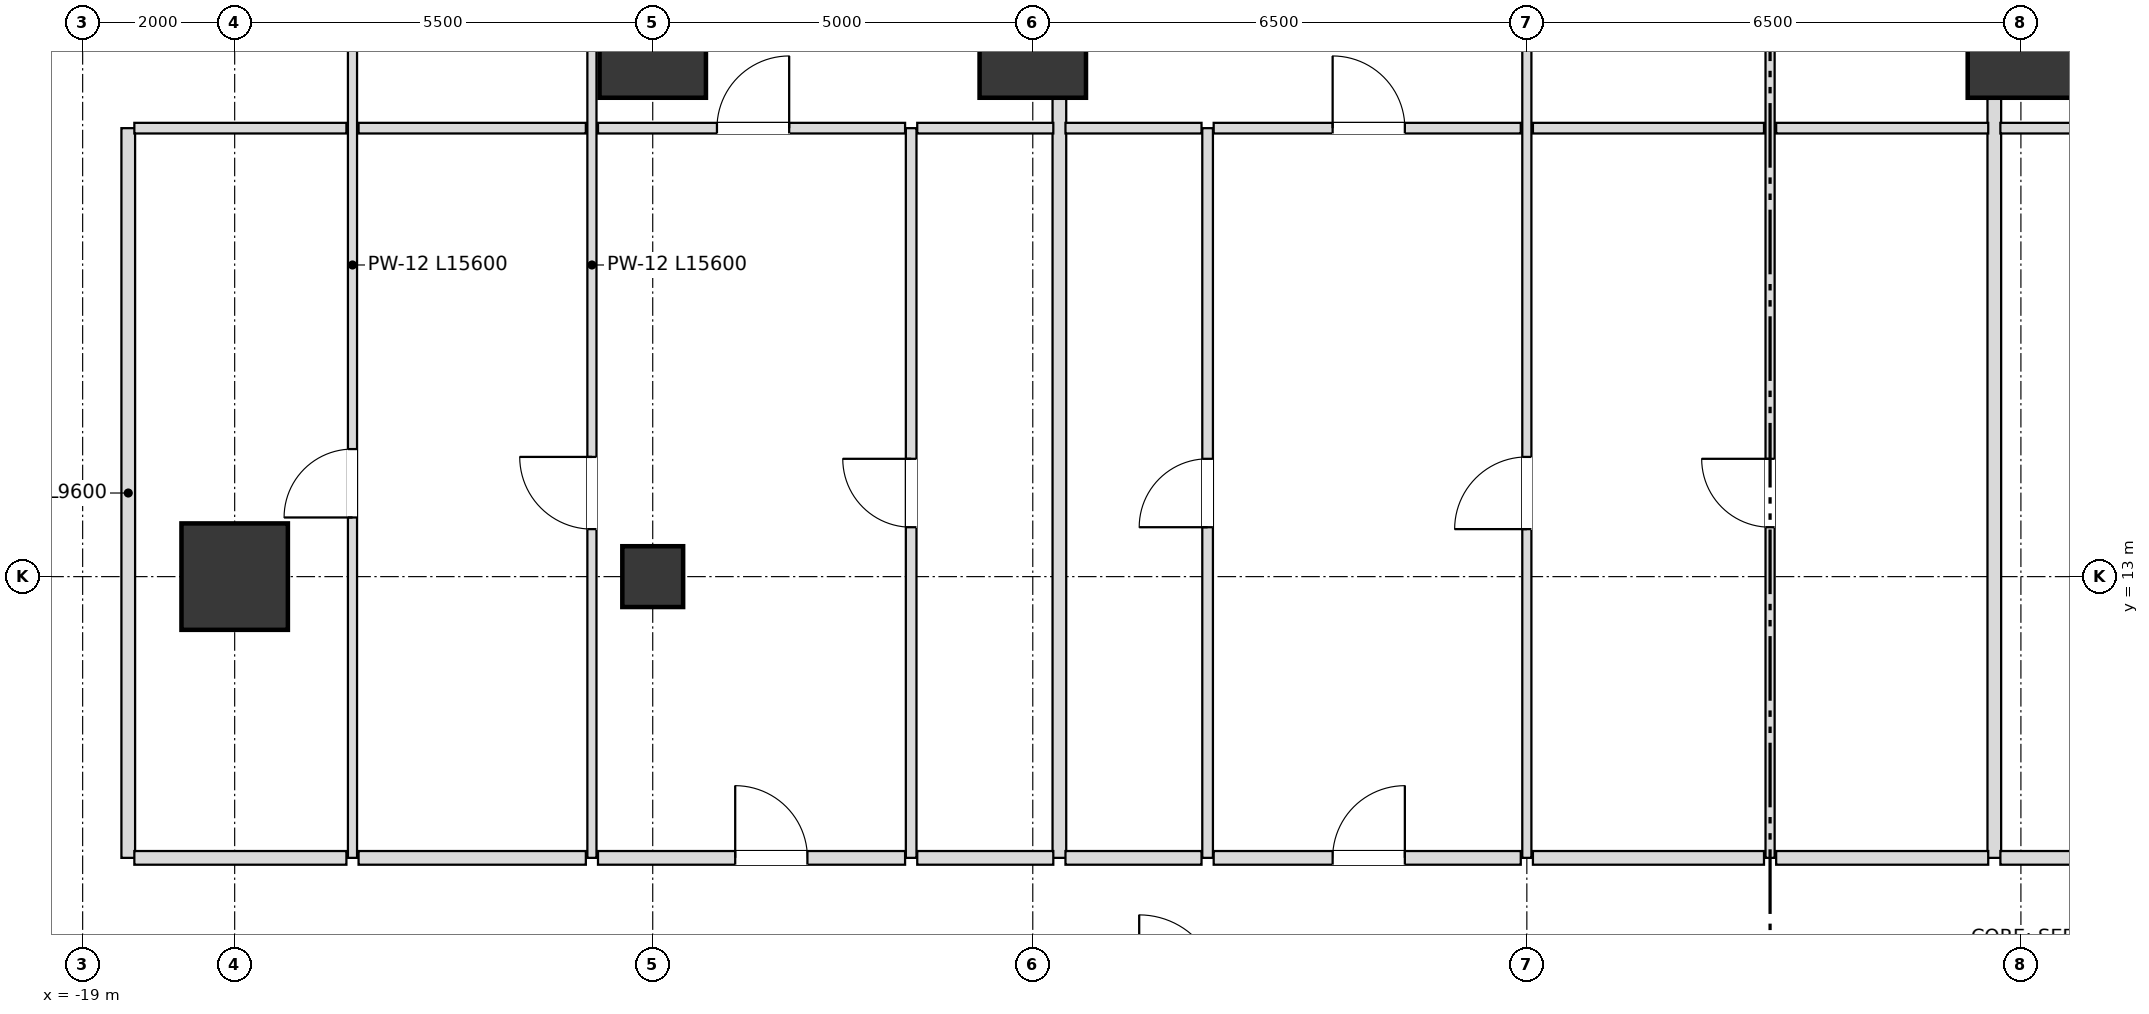
"""IFC4 building model, lengths in metres.
Left out: names, types, materials, properties, quantities, classifications, styles, units other than length and angle.
Written with IfcOpenShell. Run it as: python <this file> out.ifc"""

import sys

from ifc_helpers import new_model, si_unit, direction, frame, frame_2d, origin, origin_2d, place, context, subcontext, project, spatial, rectangle, extrude, element, fill, save


model = new_model("IFC4")
c1 = context("Model", 3, precision=1e-05, world=origin(), true_north=direction((0.0, 1.0)))
c2 = subcontext(c1, "Body", "Model", "MODEL_VIEW")
j1 = project(units=[si_unit("LENGTHUNIT", "METRE"), si_unit("PLANEANGLEUNIT", "RADIAN")], contexts=[c1])
p1 = place(None, origin())
s1 = spatial("IfcSite", under=j1, at=p1, CompositionType="ELEMENT")
p2 = place(p1, origin())
s2 = spatial("IfcBuilding", under=s1, at=p2, CompositionType="ELEMENT")
p3 = place(p2, frame((0.0, 0.0, 39.6)))
s3 = spatial("IfcBuildingStorey", under=s2, at=p3, CompositionType="ELEMENT", Elevation=39.6)
for number, where, z_axis, x_axis in (
    (1, (6.5, 20.0, 0.0), (0.0, 0.0, 1.0), (1.0, 0.0, 0.0)),
    (2, (-6.5, 20.0, 0.0), (0.0, 0.0, 1.0), (1.0, 0.0, 0.0)),
    (3, (-11.5, 20.0, 0.0), (0.0, 0.0, 1.0), (1.0, 0.0, 0.0)),
    (4, (-17.0, 13.0, 0.0), (0.0, 0.0, 1.0), (1.0, 0.0, 0.0)),
):
    element("IfcColumn", number, at=place(p3, frame(where, z_axis=z_axis, x_axis=x_axis)), inside=s3, PredefinedType="USERDEFINED", context=c2, shape_type="SweptSolid", body=[
        extrude(rectangle(XDim=1.4, YDim=1.4, at=origin_2d()), origin(), (0.0, 0.0, 1.0), 3.6),
    ])
p4 = place(p3, frame((-11.5, 13.0, 0.0), z_axis=(0.0, 0.0, 1.0), x_axis=(1.0, 0.0, 0.0)))
e5 = element("IfcColumn", 5, at=p4, inside=s3, PredefinedType="COLUMN", context=c2, shape_type="SweptSolid", body=[
    extrude(rectangle(XDim=0.8, YDim=0.8, at=origin_2d()), origin(), (0.0, 0.0, 1.0), 3.6),
])
p5 = place(p3, frame((-18.4, 9.3, 0.0), z_axis=(0.0, 0.0, 1.0), x_axis=(0.0, 1.0, 0.0)))
e6 = element("IfcWall", 6, at=p5, inside=s3, PredefinedType="PARTITIONING", context=c2, shape_type="SweptSolid", body=[
    extrude(rectangle(XDim=9.6, YDim=0.18, at=frame_2d((4.8, 0.0))), origin(), (0.0, 0.0, 1.0), 2.736),
])
p6 = place(p3, frame((-15.45, 9.3, 0.0), z_axis=(0.0, 0.0, 1.0), x_axis=(0.0, 1.0, 0.0)))
e7 = element("IfcWall", 7, at=p6, inside=s3, PredefinedType="PARTITIONING", context=c2, shape_type="SweptSolid", body=[
    extrude(rectangle(XDim=15.6, YDim=0.12, at=frame_2d((7.8, 0.0))), origin(), (0.0, 0.0, 1.0), 2.736),
])
p7 = place(p6, frame((4.478, 0.0, 0.0)))
e8 = element("IfcOpeningElement", 8, at=p7, cuts=e7, PredefinedType="OPENING", context=c2, shape_type="SweptSolid", body=[
    extrude(rectangle(XDim=0.9, YDim=2.1, at=frame_2d((0.45, 1.05))), frame((0.0, 0.07, 0.0), z_axis=(0.0, -1.0, 0.0), x_axis=(1.0, 0.0, 0.0)), (0.0, 0.0, 1.0), 0.14),
])
p8 = place(p6, frame((12.15, 0.0, 0.0)))
e9 = element("IfcOpeningElement", 9, at=p8, cuts=e7, PredefinedType="OPENING", context=c2, shape_type="SweptSolid", body=[
    extrude(rectangle(XDim=0.9, YDim=2.1, at=frame_2d((0.45, 1.05))), frame((0.0, 0.07, 0.0), z_axis=(0.0, -1.0, 0.0), x_axis=(1.0, 0.0, 0.0)), (0.0, 0.0, 1.0), 0.14),
])
p9 = place(p3, frame((-12.3, 9.3, 0.0), z_axis=(0.0, 0.0, 1.0), x_axis=(0.0, 1.0, 0.0)))
e10 = element("IfcWall", 10, at=p9, inside=s3, PredefinedType="PARTITIONING", context=c2, shape_type="SweptSolid", body=[
    extrude(rectangle(XDim=15.6, YDim=0.12, at=frame_2d((7.8, 0.0))), origin(), (0.0, 0.0, 1.0), 2.736),
])
p10 = place(p9, frame((4.325, 0.0, 0.0)))
e11 = element("IfcOpeningElement", 11, at=p10, cuts=e10, PredefinedType="OPENING", context=c2, shape_type="SweptSolid", body=[
    extrude(rectangle(XDim=0.95, YDim=2.1, at=frame_2d((0.475, 1.05))), frame((0.0, 0.07, 0.0), z_axis=(0.0, -1.0, 0.0), x_axis=(1.0, 0.0, 0.0)), (0.0, 0.0, 1.0), 0.14),
])
p11 = place(p9, frame((12.15, 0.0, 0.0)))
e12 = element("IfcOpeningElement", 12, at=p11, cuts=e10, PredefinedType="OPENING", context=c2, shape_type="SweptSolid", body=[
    extrude(rectangle(XDim=0.9, YDim=2.1, at=frame_2d((0.45, 1.05))), frame((0.0, 0.07, 0.0), z_axis=(0.0, -1.0, 0.0), x_axis=(1.0, 0.0, 0.0)), (0.0, 0.0, 1.0), 0.14),
])
p12 = place(p3, frame((-8.1, 9.3, 0.0), z_axis=(0.0, 0.0, 1.0), x_axis=(0.0, 1.0, 0.0)))
e13 = element("IfcWall", 13, at=p12, inside=s3, PredefinedType="PARTITIONING", context=c2, shape_type="SweptSolid", body=[
    extrude(rectangle(XDim=9.6, YDim=0.14, at=frame_2d((4.8, 0.0))), origin(), (0.0, 0.0, 1.0), 2.816),
])
p13 = place(p12, frame((4.35, 0.0, 0.0)))
e14 = element("IfcOpeningElement", 14, at=p13, cuts=e13, PredefinedType="OPENING", context=c2, shape_type="SweptSolid", body=[
    extrude(rectangle(XDim=0.9, YDim=2.1, at=frame_2d((0.45, 1.05))), frame((0.0, 0.08, 0.0), z_axis=(0.0, -1.0, 0.0), x_axis=(1.0, 0.0, 0.0)), (0.0, 0.0, 1.0), 0.16),
])
p14 = place(p3, frame((-6.15, 9.3, 0.0), z_axis=(0.0, 0.0, 1.0), x_axis=(0.0, 1.0, 0.0)))
e15 = element("IfcWall", 15, at=p14, inside=s3, PredefinedType="PARTITIONING", context=c2, shape_type="SweptSolid", body=[
    extrude(rectangle(XDim=15.6, YDim=0.18, at=frame_2d((7.8, 0.0))), origin(), (0.0, 0.0, 1.0), 2.816),
])
p15 = place(p3, frame((-4.2, 9.3, 0.0), z_axis=(0.0, 0.0, 1.0), x_axis=(0.0, 1.0, 0.0)))
e16 = element("IfcWall", 16, at=p15, inside=s3, PredefinedType="PARTITIONING", context=c2, shape_type="SweptSolid", body=[
    extrude(rectangle(XDim=9.6, YDim=0.14, at=frame_2d((4.8, 0.0))), origin(), (0.0, 0.0, 1.0), 2.948),
])
p16 = place(p15, frame((4.35, 0.0, 0.0)))
e17 = element("IfcOpeningElement", 17, at=p16, cuts=e16, PredefinedType="OPENING", context=c2, shape_type="SweptSolid", body=[
    extrude(rectangle(XDim=0.9, YDim=2.1, at=frame_2d((0.45, 1.05))), frame((0.0, 0.08, 0.0), z_axis=(0.0, -1.0, 0.0), x_axis=(1.0, 0.0, 0.0)), (0.0, 0.0, 1.0), 0.16),
])
p17 = place(p3, frame((0.0, 9.3, 0.0), z_axis=(0.0, 0.0, 1.0), x_axis=(0.0, 1.0, 0.0)))
e18 = element("IfcWall", 18, at=p17, inside=s3, PredefinedType="PARTITIONING", context=c2, shape_type="SweptSolid", body=[
    extrude(rectangle(XDim=15.6, YDim=0.12, at=frame_2d((7.8, 0.0))), origin(), (0.0, 0.0, 1.0), 2.816),
])
p18 = place(p17, frame((4.325, 0.0, 0.0)))
e19 = element("IfcOpeningElement", 19, at=p18, cuts=e18, PredefinedType="OPENING", context=c2, shape_type="SweptSolid", body=[
    extrude(rectangle(XDim=0.95, YDim=2.1, at=frame_2d((0.475, 1.05))), frame((0.0, 0.07, 0.0), z_axis=(0.0, -1.0, 0.0), x_axis=(1.0, 0.0, 0.0)), (0.0, 0.0, 1.0), 0.14),
])
p19 = place(p17, frame((12.15, 0.0, 0.0)))
e20 = element("IfcOpeningElement", 20, at=p19, cuts=e18, PredefinedType="OPENING", context=c2, shape_type="SweptSolid", body=[
    extrude(rectangle(XDim=0.9, YDim=2.1, at=frame_2d((0.45, 1.05))), frame((0.0, 0.07, 0.0), z_axis=(0.0, -1.0, 0.0), x_axis=(1.0, 0.0, 0.0)), (0.0, 0.0, 1.0), 0.14),
])
p20 = place(p3, frame((3.2, 9.3, 0.0), z_axis=(0.0, 0.0, 1.0), x_axis=(0.0, 1.0, 0.0)))
e21 = element("IfcWall", 21, at=p20, inside=s3, PredefinedType="PARTITIONING", context=c2, shape_type="SweptSolid", body=[
    extrude(rectangle(XDim=15.6, YDim=0.12, at=frame_2d((7.8, 0.0))), origin(), (0.0, 0.0, 1.0), 2.816),
])
p21 = place(p20, frame((4.35, 0.0, 0.0)))
e22 = element("IfcOpeningElement", 22, at=p21, cuts=e21, PredefinedType="OPENING", context=c2, shape_type="SweptSolid", body=[
    extrude(rectangle(XDim=0.9, YDim=2.1, at=frame_2d((0.45, 1.05))), frame((0.0, 0.07, 0.0), z_axis=(0.0, -1.0, 0.0), x_axis=(1.0, 0.0, 0.0)), (0.0, 0.0, 1.0), 0.14),
])
p22 = place(p20, frame((12.15, 0.0, 0.0)))
e23 = element("IfcOpeningElement", 23, at=p22, cuts=e21, PredefinedType="OPENING", context=c2, shape_type="SweptSolid", body=[
    extrude(rectangle(XDim=0.9, YDim=2.1, at=frame_2d((0.45, 1.05))), frame((0.0, 0.07, 0.0), z_axis=(0.0, -1.0, 0.0), x_axis=(1.0, 0.0, 0.0)), (0.0, 0.0, 1.0), 0.14),
])
p23 = place(p3, frame((6.15, 9.3, 0.0), z_axis=(0.0, 0.0, 1.0), x_axis=(0.0, 1.0, 0.0)))
e24 = element("IfcWall", 24, at=p23, inside=s3, PredefinedType="PARTITIONING", context=c2, shape_type="SweptSolid", body=[
    extrude(rectangle(XDim=15.6, YDim=0.18, at=frame_2d((7.8, 0.0))), origin(), (0.0, 0.0, 1.0), 2.816),
])
p24 = place(p3, frame((-18.32, 9.3, 0.0), z_axis=(0.0, 0.0, 1.0), x_axis=(1.0, 0.0, 0.0)))
e25 = element("IfcWall", 25, at=p24, inside=s3, PredefinedType="PARTITIONING", context=c2, shape_type="SweptSolid", body=[
    extrude(rectangle(XDim=2.79, YDim=0.18, at=frame_2d((1.395, 0.0))), origin(), (0.0, 0.0, 1.0), 2.816),
])
p25 = place(p3, frame((-15.37, 9.3, 0.0), z_axis=(0.0, 0.0, 1.0), x_axis=(1.0, 0.0, 0.0)))
e26 = element("IfcWall", 26, at=p25, inside=s3, PredefinedType="PARTITIONING", context=c2, shape_type="SweptSolid", body=[
    extrude(rectangle(XDim=2.99, YDim=0.18, at=frame_2d((1.495, 0.0))), origin(), (0.0, 0.0, 1.0), 3.38),
])
p26 = place(p3, frame((-12.22, 9.3, 0.0), z_axis=(0.0, 0.0, 1.0), x_axis=(1.0, 0.0, 0.0)))
e27 = element("IfcWall", 27, at=p26, inside=s3, PredefinedType="PARTITIONING", context=c2, shape_type="SweptSolid", body=[
    extrude(rectangle(XDim=4.04, YDim=0.18, at=frame_2d((2.02, 0.0))), origin(), (0.0, 0.0, 1.0), 3.38),
])
p27 = place(p26, frame((1.805, 0.0, 0.0)))
e28 = element("IfcOpeningElement", 28, at=p27, cuts=e27, PredefinedType="OPENING", context=c2, shape_type="SweptSolid", body=[
    extrude(rectangle(XDim=0.95, YDim=2.15, at=frame_2d((0.475, 1.075))), frame((0.0, 0.1, 0.0), z_axis=(0.0, -1.0, 0.0), x_axis=(1.0, 0.0, 0.0)), (0.0, 0.0, 1.0), 0.2),
])
p28 = place(p3, frame((-8.02, 9.3, 0.0), z_axis=(0.0, 0.0, 1.0), x_axis=(1.0, 0.0, 0.0)))
e29 = element("IfcWall", 29, at=p28, inside=s3, PredefinedType="PARTITIONING", context=c2, shape_type="SweptSolid", body=[
    extrude(rectangle(XDim=1.79, YDim=0.18, at=frame_2d((0.895, 0.0))), origin(), (0.0, 0.0, 1.0), 2.816),
])
p29 = place(p3, frame((-6.07, 9.3, 0.0), z_axis=(0.0, 0.0, 1.0), x_axis=(1.0, 0.0, 0.0)))
e30 = element("IfcWall", 30, at=p29, inside=s3, PredefinedType="PARTITIONING", context=c2, shape_type="SweptSolid", body=[
    extrude(rectangle(XDim=1.79, YDim=0.18, at=frame_2d((0.895, 0.0))), origin(), (0.0, 0.0, 1.0), 3.38),
])
p30 = place(p3, frame((-4.12, 9.3, 0.0), z_axis=(0.0, 0.0, 1.0), x_axis=(1.0, 0.0, 0.0)))
e31 = element("IfcWall", 31, at=p30, inside=s3, PredefinedType="PARTITIONING", context=c2, shape_type="SweptSolid", body=[
    extrude(rectangle(XDim=4.04, YDim=0.18, at=frame_2d((2.02, 0.0))), origin(), (0.0, 0.0, 1.0), 3.38),
])
p31 = place(p30, frame((1.565, 0.0, 0.0)))
e32 = element("IfcOpeningElement", 32, at=p31, cuts=e31, PredefinedType="OPENING", context=c2, shape_type="SweptSolid", body=[
    extrude(rectangle(XDim=0.95, YDim=2.15, at=frame_2d((0.475, 1.075))), frame((0.0, 0.1, 0.0), z_axis=(0.0, -1.0, 0.0), x_axis=(1.0, 0.0, 0.0)), (0.0, 0.0, 1.0), 0.2),
])
p32 = place(p3, frame((0.08, 9.3, 0.0), z_axis=(0.0, 0.0, 1.0), x_axis=(1.0, 0.0, 0.0)))
e33 = element("IfcWall", 33, at=p32, inside=s3, PredefinedType="PARTITIONING", context=c2, shape_type="SweptSolid", body=[
    extrude(rectangle(XDim=3.04, YDim=0.18, at=frame_2d((1.52, 0.0))), origin(), (0.0, 0.0, 1.0), 3.38),
])
p33 = place(p3, frame((3.28, 9.3, 0.0), z_axis=(0.0, 0.0, 1.0), x_axis=(1.0, 0.0, 0.0)))
e34 = element("IfcWall", 34, at=p33, inside=s3, PredefinedType="PARTITIONING", context=c2, shape_type="SweptSolid", body=[
    extrude(rectangle(XDim=2.79, YDim=0.18, at=frame_2d((1.395, 0.0))), origin(), (0.0, 0.0, 1.0), 3.38),
])
p34 = place(p3, frame((6.23, 9.3, 0.0), z_axis=(0.0, 0.0, 1.0), x_axis=(1.0, 0.0, 0.0)))
e35 = element("IfcWall", 35, at=p34, inside=s3, PredefinedType="PARTITIONING", context=c2, shape_type="SweptSolid", body=[
    extrude(rectangle(XDim=1.79, YDim=0.18, at=frame_2d((0.895, 0.0))), origin(), (0.0, 0.0, 1.0), 2.816),
])
p35 = place(p3, frame((-18.32, 18.9, 0.0), z_axis=(0.0, 0.0, 1.0), x_axis=(1.0, 0.0, 0.0)))
e36 = element("IfcWall", 36, at=p35, inside=s3, PredefinedType="PARTITIONING", context=c2, shape_type="SweptSolid", body=[
    extrude(rectangle(XDim=2.79, YDim=0.14, at=frame_2d((1.395, 0.0))), origin(), (0.0, 0.0, 1.0), 2.736),
])
p36 = place(p3, frame((-15.37, 18.9, 0.0), z_axis=(0.0, 0.0, 1.0), x_axis=(1.0, 0.0, 0.0)))
e37 = element("IfcWall", 37, at=p36, inside=s3, PredefinedType="PARTITIONING", context=c2, shape_type="SweptSolid", body=[
    extrude(rectangle(XDim=2.99, YDim=0.14, at=frame_2d((1.495, 0.0))), origin(), (0.0, 0.0, 1.0), 2.736),
])
p37 = place(p3, frame((-12.22, 18.9, 0.0), z_axis=(0.0, 0.0, 1.0), x_axis=(1.0, 0.0, 0.0)))
e38 = element("IfcWall", 38, at=p37, inside=s3, PredefinedType="PARTITIONING", context=c2, shape_type="SweptSolid", body=[
    extrude(rectangle(XDim=4.04, YDim=0.14, at=frame_2d((2.02, 0.0))), origin(), (0.0, 0.0, 1.0), 2.736),
])
p38 = place(p37, frame((1.565, 0.0, 0.0)))
e39 = element("IfcOpeningElement", 39, at=p38, cuts=e38, PredefinedType="OPENING", context=c2, shape_type="SweptSolid", body=[
    extrude(rectangle(XDim=0.95, YDim=2.1, at=frame_2d((0.475, 1.05))), frame((0.0, 0.08, 0.0), z_axis=(0.0, -1.0, 0.0), x_axis=(1.0, 0.0, 0.0)), (0.0, 0.0, 1.0), 0.16),
])
p39 = place(p3, frame((-8.02, 18.9, 0.0), z_axis=(0.0, 0.0, 1.0), x_axis=(1.0, 0.0, 0.0)))
e40 = element("IfcWall", 40, at=p39, inside=s3, PredefinedType="PARTITIONING", context=c2, shape_type="SweptSolid", body=[
    extrude(rectangle(XDim=1.79, YDim=0.14, at=frame_2d((0.895, 0.0))), origin(), (0.0, 0.0, 1.0), 2.816),
])
p40 = place(p3, frame((-6.07, 18.9, 0.0), z_axis=(0.0, 0.0, 1.0), x_axis=(1.0, 0.0, 0.0)))
e41 = element("IfcWall", 41, at=p40, inside=s3, PredefinedType="PARTITIONING", context=c2, shape_type="SweptSolid", body=[
    extrude(rectangle(XDim=1.79, YDim=0.14, at=frame_2d((0.895, 0.0))), origin(), (0.0, 0.0, 1.0), 3.38),
])
p41 = place(p3, frame((-4.12, 18.9, 0.0), z_axis=(0.0, 0.0, 1.0), x_axis=(1.0, 0.0, 0.0)))
e42 = element("IfcWall", 42, at=p41, inside=s3, PredefinedType="PARTITIONING", context=c2, shape_type="SweptSolid", body=[
    extrude(rectangle(XDim=4.04, YDim=0.14, at=frame_2d((2.02, 0.0))), origin(), (0.0, 0.0, 1.0), 3.38),
])
p42 = place(p41, frame((1.565, 0.0, 0.0)))
e43 = element("IfcOpeningElement", 43, at=p42, cuts=e42, PredefinedType="OPENING", context=c2, shape_type="SweptSolid", body=[
    extrude(rectangle(XDim=0.95, YDim=2.1, at=frame_2d((0.475, 1.05))), frame((0.0, 0.08, 0.0), z_axis=(0.0, -1.0, 0.0), x_axis=(1.0, 0.0, 0.0)), (0.0, 0.0, 1.0), 0.16),
])
p43 = place(p3, frame((0.08, 18.9, 0.0), z_axis=(0.0, 0.0, 1.0), x_axis=(1.0, 0.0, 0.0)))
e44 = element("IfcWall", 44, at=p43, inside=s3, PredefinedType="PARTITIONING", context=c2, shape_type="SweptSolid", body=[
    extrude(rectangle(XDim=3.04, YDim=0.14, at=frame_2d((1.52, 0.0))), origin(), (0.0, 0.0, 1.0), 3.38),
])
p44 = place(p3, frame((3.28, 18.9, 0.0), z_axis=(0.0, 0.0, 1.0), x_axis=(1.0, 0.0, 0.0)))
e45 = element("IfcWall", 45, at=p44, inside=s3, PredefinedType="PARTITIONING", context=c2, shape_type="SweptSolid", body=[
    extrude(rectangle(XDim=2.79, YDim=0.14, at=frame_2d((1.395, 0.0))), origin(), (0.0, 0.0, 1.0), 3.38),
])
p45 = place(p3, frame((6.23, 18.9, 0.0), z_axis=(0.0, 0.0, 1.0), x_axis=(1.0, 0.0, 0.0)))
e46 = element("IfcWall", 46, at=p45, inside=s3, PredefinedType="PARTITIONING", context=c2, shape_type="SweptSolid", body=[
    extrude(rectangle(XDim=1.79, YDim=0.14, at=frame_2d((0.895, 0.0))), origin(), (0.0, 0.0, 1.0), 2.816),
])
p46 = place(p13, origin())
e47 = element("IfcDoor", 47, at=p46, inside=s3, OperationType="SINGLE_SWING_RIGHT", PredefinedType="DOOR", context=c2, shape_type="SweptSolid", body=[
    extrude(rectangle(XDim=0.9, YDim=2.1, at=frame_2d((0.45, 1.05))), frame((0.0, 0.025, 0.0), z_axis=(0.0, -1.0, 0.0), x_axis=(1.0, 0.0, 0.0)), (0.0, 0.0, 1.0), 0.05),
])
fill(e14, e47)
p47 = place(p27, origin())
e48 = element("IfcDoor", 48, at=p47, inside=s3, OperationType="SINGLE_SWING_LEFT", PredefinedType="DOOR", context=c2, shape_type="SweptSolid", body=[
    extrude(rectangle(XDim=0.95, YDim=2.15, at=frame_2d((0.475, 1.075))), frame((0.0, 0.025, 0.0), z_axis=(0.0, -1.0, 0.0), x_axis=(1.0, 0.0, 0.0)), (0.0, 0.0, 1.0), 0.05),
])
fill(e28, e48)
p48 = place(p10, origin())
e49 = element("IfcDoor", 49, at=p48, inside=s3, OperationType="SINGLE_SWING_RIGHT", PredefinedType="DOOR", context=c2, shape_type="SweptSolid", body=[
    extrude(rectangle(XDim=0.95, YDim=2.1, at=frame_2d((0.475, 1.05))), frame((0.0, 0.025, 0.0), z_axis=(0.0, -1.0, 0.0), x_axis=(1.0, 0.0, 0.0)), (0.0, 0.0, 1.0), 0.05),
])
fill(e11, e49)
p49 = place(p7, origin())
e50 = element("IfcDoor", 50, at=p49, inside=s3, OperationType="SINGLE_SWING_LEFT", PredefinedType="DOOR", context=c2, shape_type="SweptSolid", body=[
    extrude(rectangle(XDim=0.9, YDim=2.1, at=frame_2d((0.45, 1.05))), frame((0.0, 0.025, 0.0), z_axis=(0.0, -1.0, 0.0), x_axis=(1.0, 0.0, 0.0)), (0.0, 0.0, 1.0), 0.05),
])
fill(e8, e50)
p50 = place(p38, origin())
e51 = element("IfcDoor", 51, at=p50, inside=s3, OperationType="SINGLE_SWING_RIGHT", PredefinedType="DOOR", context=c2, shape_type="SweptSolid", body=[
    extrude(rectangle(XDim=0.95, YDim=2.1, at=frame_2d((0.475, 1.05))), frame((0.0, 0.025, 0.0), z_axis=(0.0, -1.0, 0.0), x_axis=(1.0, 0.0, 0.0)), (0.0, 0.0, 1.0), 0.05),
])
fill(e39, e51)
p51 = place(p16, origin())
e52 = element("IfcDoor", 52, at=p51, inside=s3, OperationType="SINGLE_SWING_LEFT", PredefinedType="DOOR", context=c2, shape_type="SweptSolid", body=[
    extrude(rectangle(XDim=0.9, YDim=2.1, at=frame_2d((0.45, 1.05))), frame((0.0, 0.025, 0.0), z_axis=(0.0, -1.0, 0.0), x_axis=(1.0, 0.0, 0.0)), (0.0, 0.0, 1.0), 0.05),
])
fill(e17, e52)
p52 = place(p31, origin())
e53 = element("IfcDoor", 53, at=p52, inside=s3, OperationType="SINGLE_SWING_RIGHT", PredefinedType="DOOR", context=c2, shape_type="SweptSolid", body=[
    extrude(rectangle(XDim=0.95, YDim=2.15, at=frame_2d((0.475, 1.075))), frame((0.0, 0.025, 0.0), z_axis=(0.0, -1.0, 0.0), x_axis=(1.0, 0.0, 0.0)), (0.0, 0.0, 1.0), 0.05),
])
fill(e32, e53)
p53 = place(p18, origin())
e54 = element("IfcDoor", 54, at=p53, inside=s3, OperationType="SINGLE_SWING_LEFT", PredefinedType="DOOR", context=c2, shape_type="SweptSolid", body=[
    extrude(rectangle(XDim=0.95, YDim=2.1, at=frame_2d((0.475, 1.05))), frame((0.0, 0.025, 0.0), z_axis=(0.0, -1.0, 0.0), x_axis=(1.0, 0.0, 0.0)), (0.0, 0.0, 1.0), 0.05),
])
fill(e19, e54)
p54 = place(p21, origin())
e55 = element("IfcDoor", 55, at=p54, inside=s3, OperationType="SINGLE_SWING_RIGHT", PredefinedType="DOOR", context=c2, shape_type="SweptSolid", body=[
    extrude(rectangle(XDim=0.9, YDim=2.1, at=frame_2d((0.45, 1.05))), frame((0.0, 0.025, 0.0), z_axis=(0.0, -1.0, 0.0), x_axis=(1.0, 0.0, 0.0)), (0.0, 0.0, 1.0), 0.05),
])
fill(e22, e55)
p55 = place(p42, origin())
e56 = element("IfcDoor", 56, at=p55, inside=s3, OperationType="SINGLE_SWING_LEFT", PredefinedType="DOOR", context=c2, shape_type="SweptSolid", body=[
    extrude(rectangle(XDim=0.95, YDim=2.1, at=frame_2d((0.475, 1.05))), frame((0.0, 0.025, 0.0), z_axis=(0.0, -1.0, 0.0), x_axis=(1.0, 0.0, 0.0)), (0.0, 0.0, 1.0), 0.05),
])
fill(e43, e56)
save(model, sys.argv[1])
